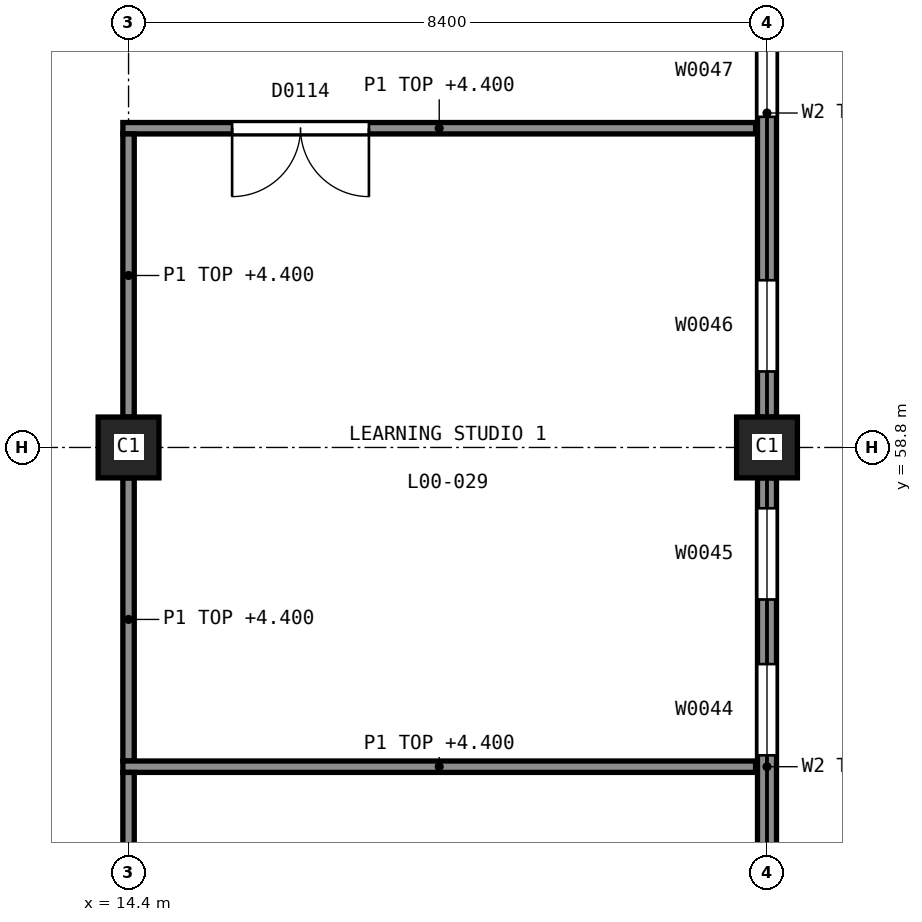
"""IFC4 building model, lengths in metres.
Left out: names, types, materials, properties, quantities, classifications, styles, units other than length and angle.
Written with IfcOpenShell. Run it as: python <this file> out.ifc"""

import sys

from ifc_helpers import new_model, si_unit, direction, frame, frame_2d, origin, origin_2d, place, context, subcontext, project, spatial, rectangle, extrude, element, fill, save


model = new_model("IFC4")
c1 = context("Model", 3, precision=1e-05, world=origin(), true_north=direction((0.0, 1.0)))
c2 = subcontext(c1, "Body", "Model", "MODEL_VIEW")
j1 = project(units=[si_unit("LENGTHUNIT", "METRE"), si_unit("PLANEANGLEUNIT", "RADIAN")], contexts=[c1])
p1 = place(None, origin())
s1 = spatial("IfcSite", under=j1, at=p1, CompositionType="ELEMENT")
p2 = place(p1, origin())
s2 = spatial("IfcBuilding", under=s1, at=p2, CompositionType="ELEMENT")
p3 = place(p2, origin())
s3 = spatial("IfcBuildingStorey", under=s2, at=p3, CompositionType="ELEMENT", Elevation=0.0)
for number, where, z_axis, x_axis in (
    (1, (14.4, 58.8, -0.3), (0.0, 0.0, 1.0), (1.0, 0.0, 0.0)),
    (2, (22.8, 58.8, -0.3), (0.0, 0.0, 1.0), (1.0, 0.0, 0.0)),
):
    element("IfcColumn", number, at=place(p3, frame(where, z_axis=z_axis, x_axis=x_axis)), inside=s3, PredefinedType="COLUMN", context=c2, shape_type="SweptSolid", body=[
        extrude(rectangle(XDim=0.8, YDim=0.8, at=origin_2d()), origin(), (0.0, 0.0, 1.0), 5.8),
    ])
p4 = place(p3, frame((22.8, 50.8, 0.0), z_axis=(0.0, 0.0, 1.0), x_axis=(0.0, 1.0, 0.0)))
e3 = element("IfcWall", 3, at=p4, inside=s3, PredefinedType="SOLIDWALL", context=c2, shape_type="SweptSolid", body=[
    extrude(rectangle(XDim=7.6, YDim=0.25, at=frame_2d((3.8, 0.0))), origin(), (0.0, 0.0, 1.0), 4.44),
])
p5 = place(p4, frame((0.4, 0.0, 0.9)))
e4 = element("IfcOpeningElement", 4, at=p5, cuts=e3, PredefinedType="OPENING", context=c2, shape_type="SweptSolid", body=[
    extrude(rectangle(XDim=1.2, YDim=2.1, at=frame_2d((0.6, 1.05))), frame((0.0, 0.135, 0.0), z_axis=(0.0, -1.0, 0.0), x_axis=(1.0, 0.0, 0.0)), (0.0, 0.0, 1.0), 0.27),
])
p6 = place(p4, frame((3.95, 0.0, 0.9)))
e5 = element("IfcOpeningElement", 5, at=p6, cuts=e3, PredefinedType="OPENING", context=c2, shape_type="SweptSolid", body=[
    extrude(rectangle(XDim=1.2, YDim=2.1, at=frame_2d((0.6, 1.05))), frame((0.0, 0.135, 0.0), z_axis=(0.0, -1.0, 0.0), x_axis=(1.0, 0.0, 0.0)), (0.0, 0.0, 1.0), 0.27),
])
p7 = place(p4, frame((6.0, 0.0, 0.9)))
e6 = element("IfcOpeningElement", 6, at=p7, cuts=e3, PredefinedType="OPENING", context=c2, shape_type="SweptSolid", body=[
    extrude(rectangle(XDim=1.2, YDim=2.1, at=frame_2d((0.6, 1.05))), frame((0.0, 0.135, 0.0), z_axis=(0.0, -1.0, 0.0), x_axis=(1.0, 0.0, 0.0)), (0.0, 0.0, 1.0), 0.27),
])
p8 = place(p3, frame((22.8, 59.2, 0.0), z_axis=(0.0, 0.0, 1.0), x_axis=(0.0, 1.0, 0.0)))
e7 = element("IfcWall", 7, at=p8, inside=s3, PredefinedType="SOLIDWALL", context=c2, shape_type="SweptSolid", body=[
    extrude(rectangle(XDim=8.0, YDim=0.25, at=frame_2d((4.0, 0.0))), origin(), (0.0, 0.0, 1.0), 4.44),
])
p9 = place(p8, frame((0.6, 0.0, 0.9)))
e8 = element("IfcOpeningElement", 8, at=p9, cuts=e7, PredefinedType="OPENING", context=c2, shape_type="SweptSolid", body=[
    extrude(rectangle(XDim=1.2, YDim=2.1, at=frame_2d((0.6, 1.05))), frame((0.0, 0.135, 0.0), z_axis=(0.0, -1.0, 0.0), x_axis=(1.0, 0.0, 0.0)), (0.0, 0.0, 1.0), 0.27),
])
p10 = place(p8, frame((3.95, 0.0, 0.9)))
e9 = element("IfcOpeningElement", 9, at=p10, cuts=e7, PredefinedType="OPENING", context=c2, shape_type="SweptSolid", body=[
    extrude(rectangle(XDim=1.2, YDim=2.1, at=frame_2d((0.6, 1.05))), frame((0.0, 0.135, 0.0), z_axis=(0.0, -1.0, 0.0), x_axis=(1.0, 0.0, 0.0)), (0.0, 0.0, 1.0), 0.27),
])
p11 = place(p8, frame((6.2, 0.0, 0.9)))
e10 = element("IfcOpeningElement", 10, at=p11, cuts=e7, PredefinedType="OPENING", context=c2, shape_type="SweptSolid", body=[
    extrude(rectangle(XDim=1.2, YDim=2.1, at=frame_2d((0.6, 1.05))), frame((0.0, 0.135, 0.0), z_axis=(0.0, -1.0, 0.0), x_axis=(1.0, 0.0, 0.0)), (0.0, 0.0, 1.0), 0.27),
])
p12 = place(p3, frame((14.325, 63.0, 0.0), z_axis=(0.0, 0.0, 1.0), x_axis=(1.0, 0.0, 0.0)))
e11 = element("IfcWall", 11, at=p12, inside=s3, PredefinedType="PARTITIONING", context=c2, shape_type="SweptSolid", body=[
    extrude(rectangle(XDim=8.325, YDim=0.15, at=frame_2d((4.163, 0.0))), origin(), (0.0, 0.0, 1.0), 4.4),
])
p13 = place(p12, frame((1.438, 0.0, 0.0)))
e12 = element("IfcOpeningElement", 12, at=p13, cuts=e11, PredefinedType="OPENING", context=c2, shape_type="SweptSolid", body=[
    extrude(rectangle(XDim=1.8, YDim=2.1, at=frame_2d((0.9, 1.05))), frame((0.0, 0.085, 0.0), z_axis=(0.0, -1.0, 0.0), x_axis=(1.0, 0.0, 0.0)), (0.0, 0.0, 1.0), 0.17),
])
p14 = place(p3, frame((14.4, 54.675, 0.0), z_axis=(0.0, 0.0, 1.0), x_axis=(0.0, 1.0, 0.0)))
e13 = element("IfcWall", 13, at=p14, inside=s3, PredefinedType="PARTITIONING", context=c2, shape_type="SweptSolid", body=[
    extrude(rectangle(XDim=3.725, YDim=0.15, at=frame_2d((1.862, 0.0))), origin(), (0.0, 0.0, 1.0), 4.4),
])
p15 = place(p3, frame((14.4, 59.2, 0.0), z_axis=(0.0, 0.0, 1.0), x_axis=(0.0, 1.0, 0.0)))
e14 = element("IfcWall", 14, at=p15, inside=s3, PredefinedType="PARTITIONING", context=c2, shape_type="SweptSolid", body=[
    extrude(rectangle(XDim=3.725, YDim=0.15, at=frame_2d((1.863, 0.0))), origin(), (0.0, 0.0, 1.0), 4.4),
])
p16 = place(p3, frame((14.325, 54.6, 0.0), z_axis=(0.0, 0.0, 1.0), x_axis=(1.0, 0.0, 0.0)))
e15 = element("IfcWall", 15, at=p16, inside=s3, PredefinedType="PARTITIONING", context=c2, shape_type="SweptSolid", body=[
    extrude(rectangle(XDim=8.325, YDim=0.15, at=frame_2d((4.163, 0.0))), origin(), (0.0, 0.0, 1.0), 4.4),
])
p17 = place(p3, frame((14.4, 50.8, 0.0), z_axis=(0.0, 0.0, 1.0), x_axis=(0.0, 1.0, 0.0)))
e16 = element("IfcWall", 16, at=p17, inside=s3, PredefinedType="PARTITIONING", context=c2, shape_type="SweptSolid", body=[
    extrude(rectangle(XDim=3.725, YDim=0.15, at=frame_2d((1.862, 0.0))), origin(), (0.0, 0.0, 1.0), 4.4),
])
p18 = place(p6, origin())
e17 = element("IfcWindow", 17, at=p18, inside=s3, PartitioningType="SINGLE_PANEL", PredefinedType="WINDOW", context=c2, shape_type="SweptSolid", body=[
    extrude(rectangle(XDim=1.2, YDim=2.1, at=frame_2d((0.6, 1.05))), frame((0.0, 0.105, 0.0), z_axis=(0.0, -1.0, 0.0), x_axis=(1.0, 0.0, 0.0)), (0.0, 0.0, 1.0), 0.06),
])
fill(e5, e17)
p19 = place(p7, origin())
e18 = element("IfcWindow", 18, at=p19, inside=s3, PartitioningType="SINGLE_PANEL", PredefinedType="WINDOW", context=c2, shape_type="SweptSolid", body=[
    extrude(rectangle(XDim=1.2, YDim=2.1, at=frame_2d((0.6, 1.05))), frame((0.0, 0.105, 0.0), z_axis=(0.0, -1.0, 0.0), x_axis=(1.0, 0.0, 0.0)), (0.0, 0.0, 1.0), 0.06),
])
fill(e6, e18)
p20 = place(p9, origin())
e19 = element("IfcWindow", 19, at=p20, inside=s3, PartitioningType="SINGLE_PANEL", PredefinedType="WINDOW", context=c2, shape_type="SweptSolid", body=[
    extrude(rectangle(XDim=1.2, YDim=2.1, at=frame_2d((0.6, 1.05))), frame((0.0, 0.105, 0.0), z_axis=(0.0, -1.0, 0.0), x_axis=(1.0, 0.0, 0.0)), (0.0, 0.0, 1.0), 0.06),
])
fill(e8, e19)
p21 = place(p10, origin())
e20 = element("IfcWindow", 20, at=p21, inside=s3, PartitioningType="SINGLE_PANEL", PredefinedType="WINDOW", context=c2, shape_type="SweptSolid", body=[
    extrude(rectangle(XDim=1.2, YDim=2.1, at=frame_2d((0.6, 1.05))), frame((0.0, 0.105, 0.0), z_axis=(0.0, -1.0, 0.0), x_axis=(1.0, 0.0, 0.0)), (0.0, 0.0, 1.0), 0.06),
])
fill(e9, e20)
p22 = place(p13, origin())
e21 = element("IfcDoor", 21, at=p22, inside=s3, OperationType="DOUBLE_DOOR_SINGLE_SWING", PredefinedType="DOOR", context=c2, shape_type="SweptSolid", body=[
    extrude(rectangle(XDim=1.8, YDim=2.1, at=frame_2d((0.9, 1.05))), frame((0.0, 0.025, 0.0), z_axis=(0.0, -1.0, 0.0), x_axis=(1.0, 0.0, 0.0)), (0.0, 0.0, 1.0), 0.05),
])
fill(e12, e21)
save(model, sys.argv[1])
